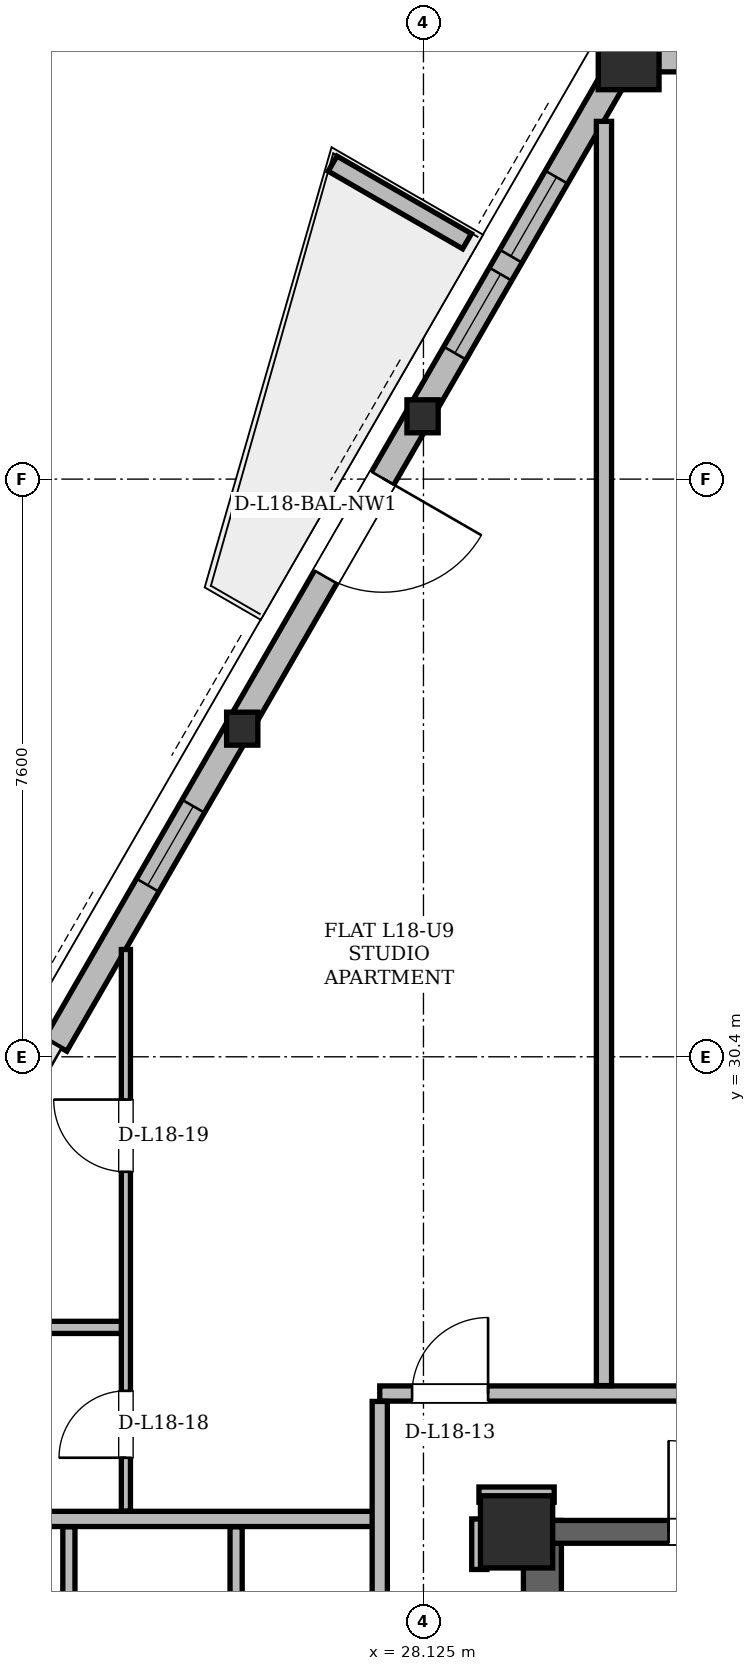
"""IFC4 building model, lengths in metres.
Left out: names, types, materials, properties, quantities, classifications, styles, units other than length and angle.
Written with IfcOpenShell. Run it as: python <this file> out.ifc"""

import sys

from ifc_helpers import new_model, si_unit, direction, frame, frame_2d, origin, origin_2d, place, context, subcontext, project, spatial, polyline, rectangle, hollow_rectangle, i_section, outline, extrude, element, fill, save


model = new_model("IFC4")
c1 = context("Model", 3, precision=1e-05, world=origin(), true_north=direction((0.0, 1.0)))
c2 = subcontext(c1, "Body", "Model", "MODEL_VIEW")
j1 = project(units=[si_unit("LENGTHUNIT", "METRE"), si_unit("PLANEANGLEUNIT", "RADIAN")], contexts=[c1])
p1 = place(None, origin())
s1 = spatial("IfcSite", under=j1, at=p1, CompositionType="ELEMENT")
p2 = place(p1, origin())
s2 = spatial("IfcBuilding", under=s1, at=p2, CompositionType="ELEMENT")
p3 = place(p2, frame((0.0, 0.0, 70.5)))
s3 = spatial("IfcBuildingStorey", under=s2, at=p3, CompositionType="ELEMENT", Elevation=70.5)
p4 = place(p3, frame((29.35, 24.15, 0.0), z_axis=(0.0, 0.0, 1.0), x_axis=(1.0, 0.0, 0.0)))
e1 = element("IfcColumn", 1, at=p4, inside=s3, PredefinedType="COLUMN", context=c2, shape_type="SweptSolid", body=[
    extrude(hollow_rectangle(XDim=0.95, YDim=0.95, WallThickness=0.08, at=origin_2d()), origin(), (0.0, 0.0, 1.0), 3.6),
])
p5 = place(p3, frame((30.773, 43.528, 0.004), z_axis=(0.028678016801, -0.002650338046, 0.999585187496), x_axis=(0.092024908784, 0.995756705307, 0.0)))
e2 = element("IfcColumn", 2, at=p5, inside=s3, PredefinedType="COLUMN", context=c2, shape_type="SweptSolid", body=[
    extrude(hollow_rectangle(XDim=0.8, YDim=0.8, WallThickness=0.065, at=origin_2d()), origin(), (0.0, 0.0, 1.0), 3.593),
])
p6 = place(p3, frame((28.065, 38.837, 0.004), z_axis=(0.026708337266, -0.005912532677, 0.99962578332), x_axis=(0.216141230312, 0.976362109342, 0.0)))
e3 = element("IfcColumn", 3, at=p6, inside=s3, PredefinedType="COLUMN", context=c2, shape_type="SweptSolid", body=[
    extrude(i_section(OverallWidth=0.411, OverallDepth=0.434, WebThickness=0.036, FlangeThickness=0.057, at=origin_2d()), origin(), (0.0, 0.0, 1.0), 3.593),
])
p7 = place(p3, frame((25.696, 34.733, 0.004), z_axis=(0.025009878433, -0.008902973029, 0.999647559419), x_axis=(0.335363176575, 0.942088923509, 0.0)))
e4 = element("IfcColumn", 4, at=p7, inside=s3, PredefinedType="COLUMN", context=c2, shape_type="SweptSolid", body=[
    extrude(i_section(OverallWidth=0.411, OverallDepth=0.434, WebThickness=0.036, FlangeThickness=0.057, at=origin_2d()), origin(), (0.0, 0.0, 1.0), 3.592),
])
p8 = place(p3, frame((29.69, 11.0, 0.0), z_axis=(0.0, 0.0, 1.0), x_axis=(0.0, 1.0, 0.0)))
e5 = element("IfcWall", 5, at=p8, inside=s3, PredefinedType="SHEAR", context=c2, shape_type="SweptSolid", body=[
    extrude(rectangle(XDim=13.3, YDim=0.5, at=frame_2d((6.65, 0.0))), origin(), (0.0, 0.0, 1.0), 3.36),
])
p9 = place(p3, frame((29.65, 24.15, 0.0), z_axis=(0.0, 0.0, 1.0), x_axis=(1.0, 0.0, 0.0)))
e6 = element("IfcWall", 6, at=p9, inside=s3, PredefinedType="SHEAR", context=c2, shape_type="SweptSolid", body=[
    extrude(rectangle(XDim=15.7, YDim=0.3, at=frame_2d((7.85, 0.0))), origin(), (0.0, 0.0, 1.0), 3.36),
])
p10 = place(p9, frame((1.7, 0.0, 0.0)))
e7 = element("IfcOpeningElement", 7, at=p10, cuts=e6, PredefinedType="OPENING", context=c2, shape_type="SweptSolid", body=[
    extrude(rectangle(XDim=1.2, YDim=2.2, at=frame_2d((0.6, 1.1))), frame((0.0, 0.15, 0.0), z_axis=(0.0, -1.0, 0.0), x_axis=(1.0, 0.0, 0.0)), (0.0, 0.0, 1.0), 0.3),
])
p11 = place(p9, frame((12.8, 0.0, 0.0)))
e8 = element("IfcOpeningElement", 8, at=p11, cuts=e6, PredefinedType="OPENING", context=c2, shape_type="SweptSolid", body=[
    extrude(rectangle(XDim=1.2, YDim=2.2, at=frame_2d((0.6, 1.1))), frame((0.0, 0.15, 0.0), z_axis=(0.0, -1.0, 0.0), x_axis=(1.0, 0.0, 0.0)), (0.0, 0.0, 1.0), 0.3),
])
p12 = place(p9, frame((7.4, 0.0, 0.0)))
e9 = element("IfcOpeningElement", 9, at=p12, cuts=e6, PredefinedType="OPENING", context=c2, shape_type="SweptSolid", body=[
    extrude(rectangle(XDim=0.9, YDim=2.05, at=frame_2d((0.45, 1.025))), frame((0.0, 0.15, 0.0), z_axis=(0.0, -1.0, 0.0), x_axis=(1.0, 0.0, 0.0)), (0.0, 0.0, 1.0), 0.3),
])
p13 = place(p3, frame((44.227, 43.528, 0.0), z_axis=(0.0, 0.0, 1.0), x_axis=(-1.0, 0.0, 0.0)))
e10 = element("IfcWall", 10, at=p13, inside=s3, PredefinedType="SOLIDWALL", context=c2, shape_type="SweptSolid", body=[
    extrude(rectangle(XDim=13.454, YDim=0.34, at=frame_2d((6.727, 0.0))), origin(), (0.0, 0.0, 1.0), 2.494),
])
p14 = place(p13, frame((3.875, 0.0, 0.52)))
e11 = element("IfcOpeningElement", 11, at=p14, cuts=e10, PredefinedType="OPENING", context=c2, shape_type="SweptSolid", body=[
    extrude(rectangle(XDim=0.85, YDim=0.92, at=frame_2d((0.425, 0.46))), frame((0.0, 0.17, 0.0), z_axis=(0.0, -1.0, 0.0), x_axis=(1.0, 0.0, 0.0)), (0.0, 0.0, 1.0), 0.34),
])
p15 = place(p3, frame((30.773, 43.528, 0.0), z_axis=(0.0, 0.0, 1.0), x_axis=(-0.499999987774, -0.866025410843, 0.0)))
e12 = element("IfcWall", 12, at=p15, inside=s3, PredefinedType="SOLIDWALL", context=c2, shape_type="SweptSolid", body=[
    extrude(rectangle(XDim=14.976, YDim=0.34, at=frame_2d((7.488, 0.0))), origin(), (0.0, 0.0, 1.0), 2.494),
])
p16 = place(p15, frame((6.369, 0.0, 0.0)))
e13 = element("IfcOpeningElement", 13, at=p16, cuts=e12, PredefinedType="OPENING", context=c2, shape_type="SweptSolid", body=[
    extrude(rectangle(XDim=1.5, YDim=2.2, at=frame_2d((0.75, 1.1))), frame((0.0, 0.17, 0.0), z_axis=(0.0, -1.0, 0.0), x_axis=(1.0, 0.0, 0.0)), (0.0, 0.0, 1.0), 0.34),
])
p17 = place(p15, frame((3.269, 0.0, 0.85)))
e14 = element("IfcOpeningElement", 14, at=p17, cuts=e12, PredefinedType="OPENING", context=c2, shape_type="SweptSolid", body=[
    extrude(rectangle(XDim=1.2, YDim=1.48, at=frame_2d((0.6, 0.74))), frame((0.0, 0.17, 0.0), z_axis=(0.0, -1.0, 0.0), x_axis=(1.0, 0.0, 0.0)), (0.0, 0.0, 1.0), 0.34),
])
p18 = place(p15, frame((11.352, 0.0, 0.85)))
e15 = element("IfcOpeningElement", 15, at=p18, cuts=e12, PredefinedType="OPENING", context=c2, shape_type="SweptSolid", body=[
    extrude(rectangle(XDim=1.2, YDim=1.48, at=frame_2d((0.6, 0.74))), frame((0.0, 0.17, 0.0), z_axis=(0.0, -1.0, 0.0), x_axis=(1.0, 0.0, 0.0)), (0.0, 0.0, 1.0), 0.34),
])
p19 = place(p15, frame((1.796, 0.0, 0.85)))
e16 = element("IfcOpeningElement", 16, at=p19, cuts=e12, PredefinedType="OPENING", context=c2, shape_type="SweptSolid", body=[
    extrude(rectangle(XDim=1.2, YDim=1.48, at=frame_2d((0.6, 0.74))), frame((0.0, 0.17, 0.0), z_axis=(0.0, -1.0, 0.0), x_axis=(1.0, 0.0, 0.0)), (0.0, 0.0, 1.0), 0.34),
])
p20 = place(p3, frame((28.698, 41.13, 0.0), z_axis=(0.0, 0.0, 1.0), x_axis=(-0.866042246008, 0.499970827278, 0.0)))
e17 = element("IfcWall", 17, at=p20, inside=s3, PredefinedType="PARAPET", context=c2, shape_type="SweptSolid", body=[
    extrude(outline(polyline([(0.0, 0.0), (2.042, 0.0), (2.042, 1.1), (0.0, 1.32), (0.0, 0.0)])), frame((0.0, 0.115, 0.0), z_axis=(0.0, -1.0, 0.0), x_axis=(1.0, 0.0, 0.0)), (0.0, 0.0, 1.0), 0.23),
])
p21 = place(p3, frame((19.885, 24.32, 0.0), z_axis=(0.0, 0.0, 1.0), x_axis=(1.0, 0.0, 0.0)))
e18 = element("IfcWall", 18, at=p21, inside=s3, PredefinedType="PARTITIONING", context=c2, shape_type="SweptSolid", body=[
    extrude(rectangle(XDim=7.666, YDim=0.2, at=frame_2d((3.833, 0.0))), origin(), (0.0, 0.0, 1.0), 2.494),
])
p22 = place(p3, frame((28.855, 24.64, 0.0), z_axis=(0.0, 0.0, 1.0), x_axis=(1.0, 0.0, 0.0)))
e19 = element("IfcWall", 19, at=p22, inside=s3, PredefinedType="PARTITIONING", context=c2, shape_type="SweptSolid", body=[
    extrude(rectangle(XDim=0.99, YDim=0.2, at=frame_2d((0.495, 0.0))), origin(), (0.0, 0.0, 1.0), 2.738),
])
p23 = place(p3, frame((27.55, 25.97, 0.0), z_axis=(0.0, 0.0, 1.0), x_axis=(1.0, 0.0, 0.0)))
e20 = element("IfcWall", 20, at=p23, inside=s3, PredefinedType="PARTITIONING", context=c2, shape_type="SweptSolid", body=[
    extrude(rectangle(XDim=19.9, YDim=0.2, at=frame_2d((9.95, 0.0))), origin(), (0.0, 0.0, 1.0), 2.738),
])
p24 = place(p23, frame((0.425, 0.0, 0.0)))
e21 = element("IfcOpeningElement", 21, at=p24, cuts=e20, PredefinedType="OPENING", context=c2, shape_type="SweptSolid", body=[
    extrude(rectangle(XDim=1.0, YDim=2.18, at=frame_2d((0.5, 1.09))), frame((0.0, 0.1, 0.0), z_axis=(0.0, -1.0, 0.0), x_axis=(1.0, 0.0, 0.0)), (0.0, 0.0, 1.0), 0.2),
])
p25 = place(p23, frame((4.347, 0.0, 0.0)))
e22 = element("IfcOpeningElement", 22, at=p25, cuts=e20, PredefinedType="OPENING", context=c2, shape_type="SweptSolid", body=[
    extrude(rectangle(XDim=1.0, YDim=2.18, at=frame_2d((0.5, 1.09))), frame((0.0, 0.1, 0.0), z_axis=(0.0, -1.0, 0.0), x_axis=(1.0, 0.0, 0.0)), (0.0, 0.0, 1.0), 0.2),
])
p26 = place(p23, frame((12.208, 0.0, 0.0)))
e23 = element("IfcOpeningElement", 23, at=p26, cuts=e20, PredefinedType="OPENING", context=c2, shape_type="SweptSolid", body=[
    extrude(rectangle(XDim=1.0, YDim=2.18, at=frame_2d((0.5, 1.09))), frame((0.0, 0.1, 0.0), z_axis=(0.0, -1.0, 0.0), x_axis=(1.0, 0.0, 0.0)), (0.0, 0.0, 1.0), 0.2),
])
p27 = place(p3, frame((21.34, 26.84, 0.0), z_axis=(0.0, 0.0, 1.0), x_axis=(1.0, 0.0, 0.0)))
e24 = element("IfcWall", 24, at=p27, inside=s3, PredefinedType="PARTITIONING", context=c2, shape_type="SweptSolid", body=[
    extrude(rectangle(XDim=2.867, YDim=0.16, at=frame_2d((1.434, 0.0))), origin(), (0.0, 0.0, 1.0), 3.36),
])
p28 = place(p3, frame((23.46, 20.044, 0.0), z_axis=(0.0, 0.0, 1.0), x_axis=(0.0, 1.0, 0.0)))
e25 = element("IfcWall", 25, at=p28, inside=s3, PredefinedType="PARTITIONING", context=c2, shape_type="SweptSolid", body=[
    extrude(rectangle(XDim=4.172, YDim=0.16, at=frame_2d((2.086, 0.0))), origin(), (0.0, 0.0, 1.0), 3.36),
])
p29 = place(p3, frame((24.21, 24.424, 0.0), z_axis=(0.0, 0.0, 1.0), x_axis=(0.0, 1.0, 0.0)))
e26 = element("IfcWall", 26, at=p29, inside=s3, PredefinedType="PARTITIONING", context=c2, shape_type="SweptSolid", body=[
    extrude(rectangle(XDim=7.388, YDim=0.12, at=frame_2d((3.694, 0.0))), origin(), (0.0, 0.0, 1.0), 2.494),
])
p30 = place(p29, frame((0.701, 0.0, 0.0)))
e27 = element("IfcOpeningElement", 27, at=p30, cuts=e26, PredefinedType="OPENING", context=c2, shape_type="SweptSolid", body=[
    extrude(rectangle(XDim=0.88, YDim=2.08, at=frame_2d((0.44, 1.04))), frame((0.0, 0.06, 0.0), z_axis=(0.0, -1.0, 0.0), x_axis=(1.0, 0.0, 0.0)), (0.0, 0.0, 1.0), 0.12),
])
p31 = place(p29, frame((4.463, 0.0, 0.0)))
e28 = element("IfcOpeningElement", 28, at=p31, cuts=e26, PredefinedType="OPENING", context=c2, shape_type="SweptSolid", body=[
    extrude(rectangle(XDim=0.95, YDim=2.1, at=frame_2d((0.475, 1.05))), frame((0.0, 0.06, 0.0), z_axis=(0.0, -1.0, 0.0), x_axis=(1.0, 0.0, 0.0)), (0.0, 0.0, 1.0), 0.12),
])
p32 = place(p3, frame((25.66, 20.044, 0.0), z_axis=(0.0, 0.0, 1.0), x_axis=(0.0, 1.0, 0.0)))
e29 = element("IfcWall", 29, at=p32, inside=s3, PredefinedType="PARTITIONING", context=c2, shape_type="SweptSolid", body=[
    extrude(rectangle(XDim=4.172, YDim=0.16, at=frame_2d((2.086, 0.0))), origin(), (0.0, 0.0, 1.0), 3.36),
])
p33 = place(p3, frame((27.55, 11.054, 0.0), z_axis=(0.0, 0.0, 1.0), x_axis=(0.0, 1.0, 0.0)))
e30 = element("IfcWall", 30, at=p33, inside=s3, PredefinedType="PARTITIONING", context=c2, shape_type="SweptSolid", body=[
    extrude(rectangle(XDim=14.812, YDim=0.2, at=frame_2d((7.406, 0.0))), origin(), (0.0, 0.0, 1.0), 2.738),
])
p34 = place(p33, frame((6.031, 0.0, 0.0)))
e31 = element("IfcOpeningElement", 31, at=p34, cuts=e30, PredefinedType="OPENING", context=c2, shape_type="SweptSolid", body=[
    extrude(rectangle(XDim=1.0, YDim=2.18, at=frame_2d((0.5, 1.09))), frame((0.0, 0.1, 0.0), z_axis=(0.0, -1.0, 0.0), x_axis=(1.0, 0.0, 0.0)), (0.0, 0.0, 1.0), 0.2),
])
p35 = place(p3, frame((28.86, 23.655, 0.0), z_axis=(0.0, 0.0, 1.0), x_axis=(0.0, 1.0, 0.0)))
e32 = element("IfcWall", 32, at=p35, inside=s3, PredefinedType="PARTITIONING", context=c2, shape_type="SweptSolid", body=[
    extrude(rectangle(XDim=0.665, YDim=0.2, at=frame_2d((0.333, 0.0))), origin(), (0.0, 0.0, 1.0), 2.946),
])
p36 = place(p3, frame((30.5, 26.074, 0.0), z_axis=(0.0, 0.0, 1.0), x_axis=(0.0, 1.0, 0.0)))
e33 = element("IfcWall", 33, at=p36, inside=s3, PredefinedType="PARTITIONING", context=c2, shape_type="SweptSolid", body=[
    extrude(rectangle(XDim=16.632, YDim=0.2, at=frame_2d((8.316, 0.0))), origin(), (0.0, 0.0, 1.0), 2.494),
])
p37 = place(p16, origin())
e34 = element("IfcDoor", 34, at=p37, inside=s3, OperationType="SINGLE_SWING_LEFT", PredefinedType="DOOR", context=c2, shape_type="SweptSolid", body=[
    extrude(rectangle(XDim=1.5, YDim=2.2, at=frame_2d((0.75, 1.1))), frame((0.0, 0.025, 0.0), z_axis=(0.0, -1.0, 0.0), x_axis=(1.0, 0.0, 0.0)), (0.0, 0.0, 1.0), 0.05),
])
fill(e13, e34)
p38 = place(p17, origin())
e35 = element("IfcWindow", 35, at=p38, inside=s3, PartitioningType="SINGLE_PANEL", PredefinedType="WINDOW", context=c2, shape_type="SweptSolid", body=[
    extrude(rectangle(XDim=1.2, YDim=1.48, at=frame_2d((0.6, 0.74))), frame((0.0, 0.03, 0.0), z_axis=(0.0, -1.0, 0.0), x_axis=(1.0, 0.0, 0.0)), (0.0, 0.0, 1.0), 0.06),
])
fill(e14, e35)
p39 = place(p18, origin())
e36 = element("IfcWindow", 36, at=p39, inside=s3, PartitioningType="SINGLE_PANEL", PredefinedType="WINDOW", context=c2, shape_type="SweptSolid", body=[
    extrude(rectangle(XDim=1.2, YDim=1.48, at=frame_2d((0.6, 0.74))), frame((0.0, 0.03, 0.0), z_axis=(0.0, -1.0, 0.0), x_axis=(1.0, 0.0, 0.0)), (0.0, 0.0, 1.0), 0.06),
])
fill(e15, e36)
p40 = place(p19, origin())
e37 = element("IfcWindow", 37, at=p40, inside=s3, PartitioningType="SINGLE_PANEL", PredefinedType="WINDOW", context=c2, shape_type="SweptSolid", body=[
    extrude(rectangle(XDim=1.2, YDim=1.48, at=frame_2d((0.6, 0.74))), frame((0.0, 0.03, 0.0), z_axis=(0.0, -1.0, 0.0), x_axis=(1.0, 0.0, 0.0)), (0.0, 0.0, 1.0), 0.06),
])
fill(e16, e37)
p41 = place(p10, origin())
e38 = element("IfcDoor", 38, at=p41, inside=s3, OperationType="SINGLE_SWING_LEFT", PredefinedType="DOOR", context=c2, shape_type="SweptSolid", body=[
    extrude(rectangle(XDim=1.2, YDim=2.2, at=frame_2d((0.6, 1.1))), frame((0.0, 0.025, 0.0), z_axis=(0.0, -1.0, 0.0), x_axis=(1.0, 0.0, 0.0)), (0.0, 0.0, 1.0), 0.05),
])
fill(e7, e38)
p42 = place(p24, origin())
e39 = element("IfcDoor", 39, at=p42, inside=s3, OperationType="SINGLE_SWING_RIGHT", PredefinedType="DOOR", context=c2, shape_type="SweptSolid", body=[
    extrude(rectangle(XDim=1.0, YDim=2.18, at=frame_2d((0.5, 1.09))), frame((0.0, 0.025, 0.0), z_axis=(0.0, -1.0, 0.0), x_axis=(1.0, 0.0, 0.0)), (0.0, 0.0, 1.0), 0.05),
])
fill(e21, e39)
p43 = place(p30, origin())
e40 = element("IfcDoor", 40, at=p43, inside=s3, OperationType="SINGLE_SWING_LEFT", PredefinedType="DOOR", context=c2, shape_type="SweptSolid", body=[
    extrude(rectangle(XDim=0.88, YDim=2.08, at=frame_2d((0.44, 1.04))), frame((0.0, 0.025, 0.0), z_axis=(0.0, -1.0, 0.0), x_axis=(1.0, 0.0, 0.0)), (0.0, 0.0, 1.0), 0.05),
])
fill(e27, e40)
p44 = place(p31, origin())
e41 = element("IfcDoor", 41, at=p44, inside=s3, OperationType="SINGLE_SWING_RIGHT", PredefinedType="DOOR", context=c2, shape_type="SweptSolid", body=[
    extrude(rectangle(XDim=0.95, YDim=2.1, at=frame_2d((0.475, 1.05))), frame((0.0, 0.025, 0.0), z_axis=(0.0, -1.0, 0.0), x_axis=(1.0, 0.0, 0.0)), (0.0, 0.0, 1.0), 0.05),
])
fill(e28, e41)
save(model, sys.argv[1])
